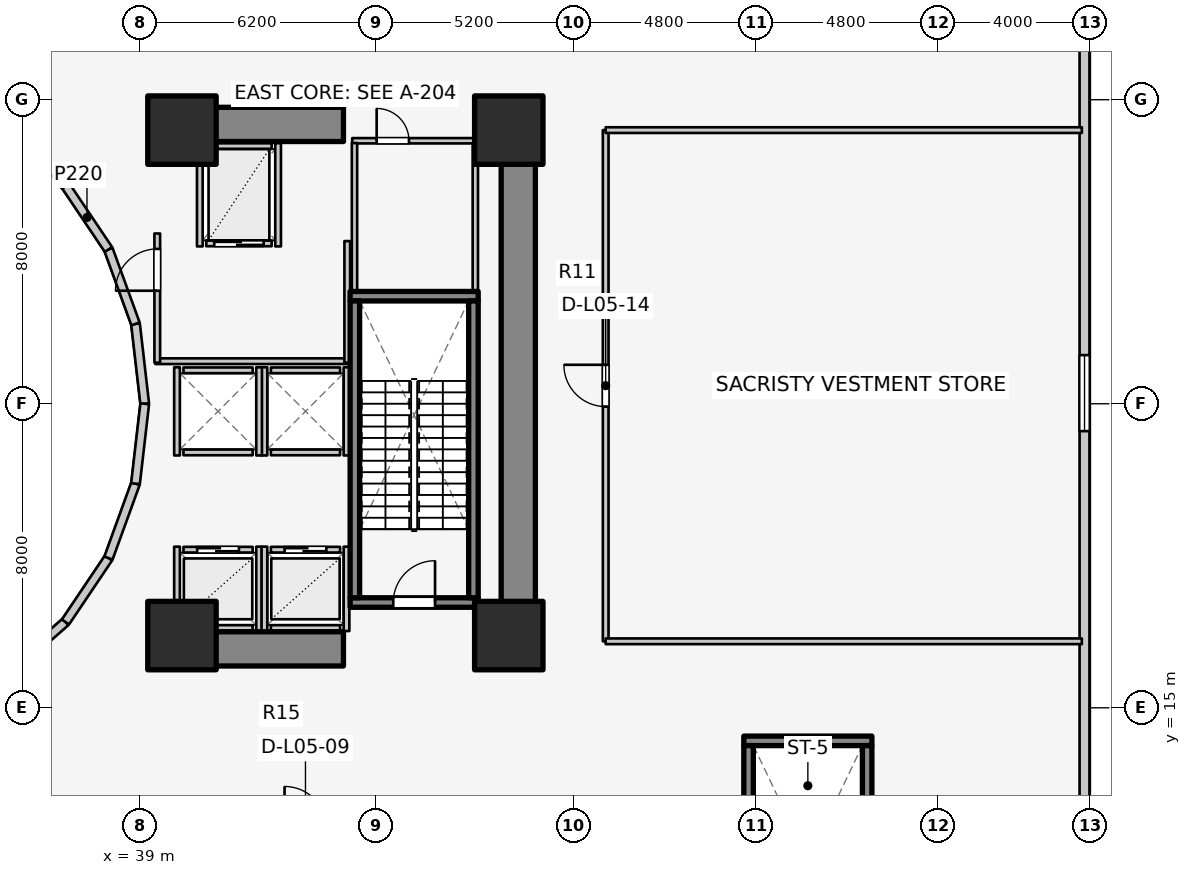
"""IFC4 building model, lengths in metres.
Left out: names, types, materials, properties, quantities, classifications, styles, units other than length and angle.
Written with IfcOpenShell. Run it as: python <this file> out.ifc"""

import sys

from ifc_helpers import new_model, si_unit, direction, frame, frame_2d, origin, origin_2d, place, context, subcontext, project, spatial, rectangle, extrude, element, fill, save


model = new_model("IFC4")
c1 = context("Model", 3, precision=1e-05, world=origin(), true_north=direction((0.0, 1.0)))
c2 = subcontext(c1, "Body", "Model", "MODEL_VIEW")
j1 = project(units=[si_unit("LENGTHUNIT", "METRE"), si_unit("PLANEANGLEUNIT", "RADIAN")], contexts=[c1])
p1 = place(None, origin())
s1 = spatial("IfcSite", under=j1, at=p1, CompositionType="ELEMENT")
p2 = place(p1, origin())
s2 = spatial("IfcBuilding", under=s1, at=p2, CompositionType="ELEMENT")
p3 = place(p2, frame((0.0, 0.0, 18.4)))
s3 = spatial("IfcBuildingStorey", under=s2, at=p3, CompositionType="ELEMENT", Elevation=18.4)
p4 = place(p3, frame((48.95, 17.05, 0.0), z_axis=(0.0, 0.0, 1.0), x_axis=(0.0, 1.0, 0.0)))
e1 = element("IfcWall", 1, at=p4, inside=s3, PredefinedType="SHEAR", context=c2, shape_type="SweptSolid", body=[
    extrude(rectangle(XDim=12.8, YDim=0.9, at=frame_2d((6.4, 0.0))), origin(), (0.0, 0.0, 1.0), 4.6),
])
for number, where, z_axis, x_axis in (
    (2, (39.85, 16.55, 0.0), (0.0, 0.0, 1.0), (1.0, 0.0, 0.0)),
    (3, (39.85, 30.35, 0.0), (0.0, 0.0, 1.0), (1.0, 0.0, 0.0)),
):
    element("IfcWall", number, at=place(p3, frame(where, z_axis=z_axis, x_axis=x_axis)), inside=s3, PredefinedType="SHEAR", context=c2, shape_type="SweptSolid", body=[
        extrude(rectangle(XDim=4.5, YDim=0.9, at=frame_2d((2.25, 0.0))), origin(), (0.0, 0.0, 1.0), 4.6),
    ])
p5 = place(p3, frame((44.525, 17.77, 0.0), z_axis=(0.0, 0.0, 1.0), x_axis=(1.0, 0.0, 0.0)))
e4 = element("IfcWall", 4, at=p5, inside=s3, PredefinedType="SOLIDWALL", context=c2, shape_type="SweptSolid", body=[
    extrude(rectangle(XDim=3.37, YDim=0.25, at=frame_2d((1.685, 0.0))), origin(), (0.0, 0.0, 1.0), 4.6),
])
p6 = place(p5, frame((1.135, 0.0, 0.0)))
e5 = element("IfcOpeningElement", 5, at=p6, cuts=e4, PredefinedType="OPENING", context=c2, shape_type="SweptSolid", body=[
    extrude(rectangle(XDim=1.1, YDim=2.1, at=frame_2d((0.55, 1.05))), frame((0.0, 0.135, 0.0), z_axis=(0.0, -1.0, 0.0), x_axis=(1.0, 0.0, 0.0)), (0.0, 0.0, 1.0), 0.27),
])
p7 = place(p3, frame((44.525, 25.83, 0.0), z_axis=(0.0, 0.0, 1.0), x_axis=(1.0, 0.0, 0.0)))
e6 = element("IfcWall", 6, at=p7, inside=s3, PredefinedType="SOLIDWALL", context=c2, shape_type="SweptSolid", body=[
    extrude(rectangle(XDim=3.37, YDim=0.25, at=frame_2d((1.685, 0.0))), origin(), (0.0, 0.0, 1.0), 4.6),
])
for number, where, z_axis, x_axis in (
    (7, (44.65, 17.895, 0.0), (0.0, 0.0, 1.0), (0.0, 1.0, 0.0)),
    (8, (47.77, 17.895, 0.0), (0.0, 0.0, 1.0), (0.0, 1.0, 0.0)),
):
    element("IfcWall", number, at=place(p3, frame(where, z_axis=z_axis, x_axis=x_axis)), inside=s3, PredefinedType="SOLIDWALL", context=c2, shape_type="SweptSolid", body=[
        extrude(rectangle(XDim=7.81, YDim=0.25, at=frame_2d((3.905, 0.0))), origin(), (0.0, 0.0, 1.0), 4.6),
    ])
p8 = place(p3, frame((54.885, 14.13, 0.0), z_axis=(0.0, 0.0, 1.0), x_axis=(1.0, 0.0, 0.0)))
e9 = element("IfcWall", 9, at=p8, inside=s3, PredefinedType="SOLIDWALL", context=c2, shape_type="SweptSolid", body=[
    extrude(rectangle(XDim=3.37, YDim=0.25, at=frame_2d((1.685, 0.0))), origin(), (0.0, 0.0, 1.0), 4.6),
])
for number, where, z_axis, x_axis in (
    (10, (55.01, 6.195, 0.0), (0.0, 0.0, 1.0), (0.0, 1.0, 0.0)),
    (11, (58.13, 6.195, 0.0), (0.0, 0.0, 1.0), (0.0, 1.0, 0.0)),
):
    element("IfcWall", number, at=place(p3, frame(where, z_axis=z_axis, x_axis=x_axis)), inside=s3, PredefinedType="SOLIDWALL", context=c2, shape_type="SweptSolid", body=[
        extrude(rectangle(XDim=7.81, YDim=0.25, at=frame_2d((3.905, 0.0))), origin(), (0.0, 0.0, 1.0), 4.6),
    ])
for number, where, z_axis, x_axis in (
    (12, (40.1, 16.9, 0.0), (0.0, 0.0, 1.0), (1.0, 0.0, 0.0)),
    (13, (48.7, 16.9, 0.0), (0.0, 0.0, 1.0), (1.0, 0.0, 0.0)),
    (14, (48.7, 30.2, 0.0), (0.0, 0.0, 1.0), (1.0, 0.0, 0.0)),
    (15, (40.1, 30.2, 0.0), (0.0, 0.0, 1.0), (1.0, 0.0, 0.0)),
):
    element("IfcColumn", number, at=place(p3, frame(where, z_axis=z_axis, x_axis=x_axis)), inside=s3, PredefinedType="COLUMN", context=c2, shape_type="SweptSolid", body=[
        extrude(rectangle(XDim=1.8, YDim=1.8, at=origin_2d()), origin(), (0.0, 0.0, 1.0), 4.6),
    ])
p9 = place(p3, frame((63.85, 0.28, 0.0), z_axis=(0.0, 0.0, 1.0), x_axis=(0.0, 1.0, 0.0)))
e16 = element("IfcWall", 16, at=p9, inside=s3, PredefinedType="STANDARD", context=c2, shape_type="SweptSolid", body=[
    extrude(rectangle(XDim=45.44, YDim=0.26, at=frame_2d((22.72, 0.0))), origin(), (0.0, 0.0, 1.0), 4.28),
])
p10 = place(p9, frame((6.0, 0.0, 2.2)))
e17 = element("IfcOpeningElement", 17, at=p10, cuts=e16, PredefinedType="OPENING", context=c2, shape_type="SweptSolid", body=[
    extrude(rectangle(XDim=2.0, YDim=1.1, at=frame_2d((1.0, 0.55))), frame((0.0, 0.14, 0.0), z_axis=(0.0, -1.0, 0.0), x_axis=(1.0, 0.0, 0.0)), (0.0, 0.0, 1.0), 0.28),
])
p11 = place(p9, frame((22.0, 0.0, 2.2)))
e18 = element("IfcOpeningElement", 18, at=p11, cuts=e16, PredefinedType="OPENING", context=c2, shape_type="SweptSolid", body=[
    extrude(rectangle(XDim=2.0, YDim=1.1, at=frame_2d((1.0, 0.55))), frame((0.0, 0.14, 0.0), z_axis=(0.0, -1.0, 0.0), x_axis=(1.0, 0.0, 0.0)), (0.0, 0.0, 1.0), 0.28),
])
p12 = place(p9, frame((38.0, 0.0, 2.2)))
e19 = element("IfcOpeningElement", 19, at=p12, cuts=e16, PredefinedType="OPENING", context=c2, shape_type="SweptSolid", body=[
    extrude(rectangle(XDim=2.0, YDim=1.1, at=frame_2d((1.0, 0.55))), frame((0.0, 0.14, 0.0), z_axis=(0.0, -1.0, 0.0), x_axis=(1.0, 0.0, 0.0)), (0.0, 0.0, 1.0), 0.28),
])
p13 = place(p3, frame((39.12, 23.0, 0.0), z_axis=(0.0, 0.0, 1.0), x_axis=(-0.114711713601, 0.993398823617, 0.0)))
e20 = element("IfcWall", 20, at=p13, inside=s3, PredefinedType="STANDARD", context=c2, shape_type="SweptSolid", body=[
    extrude(rectangle(XDim=2.115, YDim=0.23, at=frame_2d((1.058, 0.0))), origin(), (0.0, 0.0, 1.0), 3.28),
])
p14 = place(p3, frame((38.877, 25.102, 0.0), z_axis=(0.0, 0.0, 1.0), x_axis=(-0.341423187295, 0.93990968033, 0.0)))
e21 = element("IfcWall", 21, at=p14, inside=s3, PredefinedType="STANDARD", context=c2, shape_type="SweptSolid", body=[
    extrude(rectangle(XDim=2.084, YDim=0.23, at=frame_2d((1.042, 0.0))), origin(), (0.0, 0.0, 1.0), 3.28),
])
p15 = place(p3, frame((38.166, 27.06, 0.0), z_axis=(0.0, 0.0, 1.0), x_axis=(-0.558197800898, 0.829707909492, 0.0)))
e22 = element("IfcWall", 22, at=p15, inside=s3, PredefinedType="STANDARD", context=c2, shape_type="SweptSolid", body=[
    extrude(rectangle(XDim=2.027, YDim=0.23, at=frame_2d((1.013, 0.0))), origin(), (0.0, 0.0, 1.0), 3.28),
])
for number, where, z_axis, x_axis in (
    (23, (37.035, 28.742, 0.0), (0.0, 0.0, 1.0), (-0.753, 0.659, 0.0)),
    (24, (35.56, 15.968, 0.0), (0.0, 0.0, 1.0), (0.753, 0.659, 0.0)),
):
    element("IfcWall", number, at=place(p3, frame(where, z_axis=z_axis, x_axis=x_axis)), inside=s3, PredefinedType="STANDARD", context=c2, shape_type="SweptSolid", body=[
        extrude(rectangle(XDim=1.959, YDim=0.23, at=frame_2d((0.98, 0.0))), origin(), (0.0, 0.0, 1.0), 3.28),
    ])
p16 = place(p3, frame((37.035, 17.258, 0.0), z_axis=(0.0, 0.0, 1.0), x_axis=(0.558197800898, 0.829707909492, 0.0)))
e25 = element("IfcWall", 25, at=p16, inside=s3, PredefinedType="STANDARD", context=c2, shape_type="SweptSolid", body=[
    extrude(rectangle(XDim=2.027, YDim=0.23, at=frame_2d((1.013, 0.0))), origin(), (0.0, 0.0, 1.0), 3.28),
])
p17 = place(p3, frame((38.166, 18.94, 0.0), z_axis=(0.0, 0.0, 1.0), x_axis=(0.341423187295, 0.93990968033, 0.0)))
e26 = element("IfcWall", 26, at=p17, inside=s3, PredefinedType="STANDARD", context=c2, shape_type="SweptSolid", body=[
    extrude(rectangle(XDim=2.084, YDim=0.23, at=frame_2d((1.042, 0.0))), origin(), (0.0, 0.0, 1.0), 3.28),
])
p18 = place(p3, frame((38.877, 20.898, 0.0), z_axis=(0.0, 0.0, 1.0), x_axis=(0.114711713601, 0.993398823617, 0.0)))
e27 = element("IfcWall", 27, at=p18, inside=s3, PredefinedType="STANDARD", context=c2, shape_type="SweptSolid", body=[
    extrude(rectangle(XDim=2.115, YDim=0.23, at=frame_2d((1.058, 0.0))), origin(), (0.0, 0.0, 1.0), 3.28),
])
p19 = place(p3, frame((40.14, 19.16, 0.0), z_axis=(0.0, 0.0, 1.0), x_axis=(1.0, 0.0, 0.0)))
e28 = element("IfcWall", 28, at=p19, inside=s3, PredefinedType="SOLIDWALL", context=c2, shape_type="SweptSolid", body=[
    extrude(rectangle(XDim=1.82, YDim=0.15, at=frame_2d((0.91, 0.0))), origin(), (0.0, 0.0, 1.0), 3.62),
])
p20 = place(p19, frame((0.36, 0.0, 0.0)))
e29 = element("IfcOpeningElement", 29, at=p20, cuts=e28, PredefinedType="OPENING", context=c2, shape_type="SweptSolid", body=[
    extrude(rectangle(XDim=1.1, YDim=2.1, at=frame_2d((0.55, 1.05))), frame((0.0, 0.085, 0.0), z_axis=(0.0, -1.0, 0.0), x_axis=(1.0, 0.0, 0.0)), (0.0, 0.0, 1.0), 0.17),
])
p21 = place(p3, frame((40.14, 17.1, 0.0), z_axis=(0.0, 0.0, 1.0), x_axis=(1.0, 0.0, 0.0)))
e30 = element("IfcWall", 30, at=p21, inside=s3, PredefinedType="SOLIDWALL", context=c2, shape_type="SweptSolid", body=[
    extrude(rectangle(XDim=1.82, YDim=0.15, at=frame_2d((0.91, 0.0))), origin(), (0.0, 0.0, 1.0), 3.62),
])
p22 = place(p3, frame((39.97, 17.02, 0.0), z_axis=(0.0, 0.0, 1.0), x_axis=(0.0, 1.0, 0.0)))
e31 = element("IfcWall", 31, at=p22, inside=s3, PredefinedType="SOLIDWALL", context=c2, shape_type="SweptSolid", body=[
    extrude(rectangle(XDim=2.22, YDim=0.15, at=frame_2d((1.11, 0.0))), origin(), (0.0, 0.0, 1.0), 3.3),
])
p23 = place(p3, frame((42.13, 17.02, 0.0), z_axis=(0.0, 0.0, 1.0), x_axis=(0.0, 1.0, 0.0)))
e32 = element("IfcWall", 32, at=p23, inside=s3, PredefinedType="SOLIDWALL", context=c2, shape_type="SweptSolid", body=[
    extrude(rectangle(XDim=2.22, YDim=0.15, at=frame_2d((1.11, 0.0))), origin(), (0.0, 0.0, 1.0), 4.255),
])
p24 = place(p3, frame((42.44, 19.16, 0.0), z_axis=(0.0, 0.0, 1.0), x_axis=(1.0, 0.0, 0.0)))
e33 = element("IfcWall", 33, at=p24, inside=s3, PredefinedType="SOLIDWALL", context=c2, shape_type="SweptSolid", body=[
    extrude(rectangle(XDim=1.82, YDim=0.15, at=frame_2d((0.91, 0.0))), origin(), (0.0, 0.0, 1.0), 4.255),
])
p25 = place(p24, frame((0.36, 0.0, 0.0)))
e34 = element("IfcOpeningElement", 34, at=p25, cuts=e33, PredefinedType="OPENING", context=c2, shape_type="SweptSolid", body=[
    extrude(rectangle(XDim=1.1, YDim=2.1, at=frame_2d((0.55, 1.05))), frame((0.0, 0.085, 0.0), z_axis=(0.0, -1.0, 0.0), x_axis=(1.0, 0.0, 0.0)), (0.0, 0.0, 1.0), 0.17),
])
p26 = place(p3, frame((42.44, 17.1, 0.0), z_axis=(0.0, 0.0, 1.0), x_axis=(1.0, 0.0, 0.0)))
e35 = element("IfcWall", 35, at=p26, inside=s3, PredefinedType="SOLIDWALL", context=c2, shape_type="SweptSolid", body=[
    extrude(rectangle(XDim=1.82, YDim=0.15, at=frame_2d((0.91, 0.0))), origin(), (0.0, 0.0, 1.0), 4.255),
])
p27 = place(p3, frame((42.27, 17.02, 0.0), z_axis=(0.0, 0.0, 1.0), x_axis=(0.0, 1.0, 0.0)))
e36 = element("IfcWall", 36, at=p27, inside=s3, PredefinedType="SOLIDWALL", context=c2, shape_type="SweptSolid", body=[
    extrude(rectangle(XDim=2.22, YDim=0.15, at=frame_2d((1.11, 0.0))), origin(), (0.0, 0.0, 1.0), 4.255),
])
p28 = place(p3, frame((44.43, 17.02, 0.0), z_axis=(0.0, 0.0, 1.0), x_axis=(0.0, 1.0, 0.0)))
e37 = element("IfcWall", 37, at=p28, inside=s3, PredefinedType="SOLIDWALL", context=c2, shape_type="SweptSolid", body=[
    extrude(rectangle(XDim=2.22, YDim=0.15, at=frame_2d((1.11, 0.0))), origin(), (0.0, 0.0, 1.0), 3.62),
])
for number, where, z_axis, x_axis in (
    (38, (42.44, 21.72, 0.0), (0.0, 0.0, 1.0), (1.0, 0.0, 0.0)),
    (39, (42.44, 23.88, 0.0), (0.0, 0.0, 1.0), (1.0, 0.0, 0.0)),
):
    element("IfcWall", number, at=place(p3, frame(where, z_axis=z_axis, x_axis=x_axis)), inside=s3, PredefinedType="SOLIDWALL", context=c2, shape_type="SweptSolid", body=[
        extrude(rectangle(XDim=1.82, YDim=0.15, at=frame_2d((0.91, 0.0))), origin(), (0.0, 0.0, 1.0), 4.255),
    ])
for number, where, z_axis, x_axis in (
    (40, (42.27, 21.64, 0.0), (0.0, 0.0, 1.0), (0.0, 1.0, 0.0)),
    (41, (44.43, 21.64, 0.0), (0.0, 0.0, 1.0), (0.0, 1.0, 0.0)),
):
    element("IfcWall", number, at=place(p3, frame(where, z_axis=z_axis, x_axis=x_axis)), inside=s3, PredefinedType="SOLIDWALL", context=c2, shape_type="SweptSolid", body=[
        extrude(rectangle(XDim=2.32, YDim=0.15, at=frame_2d((1.16, 0.0))), origin(), (0.0, 0.0, 1.0), 4.255),
    ])
for number, where, z_axis, x_axis in (
    (42, (40.14, 21.72, 0.0), (0.0, 0.0, 1.0), (1.0, 0.0, 0.0)),
    (43, (40.14, 23.88, 0.0), (0.0, 0.0, 1.0), (1.0, 0.0, 0.0)),
):
    element("IfcWall", number, at=place(p3, frame(where, z_axis=z_axis, x_axis=x_axis)), inside=s3, PredefinedType="SOLIDWALL", context=c2, shape_type="SweptSolid", body=[
        extrude(rectangle(XDim=1.82, YDim=0.15, at=frame_2d((0.91, 0.0))), origin(), (0.0, 0.0, 1.0), 3.62),
    ])
p29 = place(p3, frame((39.97, 21.64, 0.0), z_axis=(0.0, 0.0, 1.0), x_axis=(0.0, 1.0, 0.0)))
e44 = element("IfcWall", 44, at=p29, inside=s3, PredefinedType="SOLIDWALL", context=c2, shape_type="SweptSolid", body=[
    extrude(rectangle(XDim=2.32, YDim=0.15, at=frame_2d((1.16, 0.0))), origin(), (0.0, 0.0, 1.0), 3.62),
])
p30 = place(p3, frame((42.13, 21.64, 0.0), z_axis=(0.0, 0.0, 1.0), x_axis=(0.0, 1.0, 0.0)))
e45 = element("IfcWall", 45, at=p30, inside=s3, PredefinedType="SOLIDWALL", context=c2, shape_type="SweptSolid", body=[
    extrude(rectangle(XDim=2.32, YDim=0.15, at=frame_2d((1.16, 0.0))), origin(), (0.0, 0.0, 1.0), 4.255),
])
p31 = place(p3, frame((40.74, 27.22, 0.0), z_axis=(0.0, 0.0, 1.0), x_axis=(1.0, 0.0, 0.0)))
e46 = element("IfcWall", 46, at=p31, inside=s3, PredefinedType="SOLIDWALL", context=c2, shape_type="SweptSolid", body=[
    extrude(rectangle(XDim=1.72, YDim=0.15, at=frame_2d((0.86, 0.0))), origin(), (0.0, 0.0, 1.0), 4.255),
])
p32 = place(p31, frame((0.21, 0.0, 0.0)))
e47 = element("IfcOpeningElement", 47, at=p32, cuts=e46, PredefinedType="OPENING", context=c2, shape_type="SweptSolid", body=[
    extrude(rectangle(XDim=1.3, YDim=2.1, at=frame_2d((0.65, 1.05))), frame((0.0, 0.085, 0.0), z_axis=(0.0, -1.0, 0.0), x_axis=(1.0, 0.0, 0.0)), (0.0, 0.0, 1.0), 0.17),
])
p33 = place(p3, frame((40.74, 29.78, 0.0), z_axis=(0.0, 0.0, 1.0), x_axis=(1.0, 0.0, 0.0)))
e48 = element("IfcWall", 48, at=p33, inside=s3, PredefinedType="SOLIDWALL", context=c2, shape_type="SweptSolid", body=[
    extrude(rectangle(XDim=1.72, YDim=0.15, at=frame_2d((0.86, 0.0))), origin(), (0.0, 0.0, 1.0), 4.255),
])
for number, where, z_axis, x_axis in (
    (49, (40.57, 27.14, 0.0), (0.0, 0.0, 1.0), (0.0, 1.0, 0.0)),
    (50, (42.63, 27.14, 0.0), (0.0, 0.0, 1.0), (0.0, 1.0, 0.0)),
):
    element("IfcWall", number, at=place(p3, frame(where, z_axis=z_axis, x_axis=x_axis)), inside=s3, PredefinedType="SOLIDWALL", context=c2, shape_type="SweptSolid", body=[
        extrude(rectangle(XDim=2.72, YDim=0.15, at=frame_2d((1.36, 0.0))), origin(), (0.0, 0.0, 1.0), 4.255),
    ])
p34 = place(p3, frame((39.4, 24.12, 0.0), z_axis=(0.0, 0.0, 1.0), x_axis=(1.0, 0.0, 0.0)))
e51 = element("IfcWall", 51, at=p34, inside=s3, PredefinedType="PARTITIONING", context=c2, shape_type="SweptSolid", body=[
    extrude(rectangle(XDim=5.08, YDim=0.15, at=frame_2d((2.54, 0.0))), origin(), (0.0, 0.0, 1.0), 3.62),
])
p35 = place(p3, frame((44.45, 24.08, 0.0), z_axis=(0.0, 0.0, 1.0), x_axis=(0.0, 1.0, 0.0)))
e52 = element("IfcWall", 52, at=p35, inside=s3, PredefinedType="PARTITIONING", context=c2, shape_type="SweptSolid", body=[
    extrude(rectangle(XDim=3.2, YDim=0.15, at=frame_2d((1.6, 0.0))), origin(), (0.0, 0.0, 1.0), 4.255),
])
p36 = place(p3, frame((39.45, 24.08, 0.0), z_axis=(0.0, 0.0, 1.0), x_axis=(0.0, 1.0, 0.0)))
e53 = element("IfcWall", 53, at=p36, inside=s3, PredefinedType="PARTITIONING", context=c2, shape_type="SweptSolid", body=[
    extrude(rectangle(XDim=3.4, YDim=0.15, at=frame_2d((1.7, 0.0))), origin(), (0.0, 0.0, 1.0), 4.255),
])
p37 = place(p36, frame((1.894, 0.0, 0.0)))
e54 = element("IfcOpeningElement", 54, at=p37, cuts=e53, PredefinedType="OPENING", context=c2, shape_type="SweptSolid", body=[
    extrude(rectangle(XDim=1.1, YDim=2.1, at=frame_2d((0.55, 1.05))), frame((0.0, 0.085, 0.0), z_axis=(0.0, -1.0, 0.0), x_axis=(1.0, 0.0, 0.0)), (0.0, 0.0, 1.0), 0.17),
])
p38 = place(p3, frame((51.25, 16.75, 0.0), z_axis=(0.0, 0.0, 1.0), x_axis=(0.0, 1.0, 0.0)))
e55 = element("IfcWall", 55, at=p38, inside=s3, PredefinedType="PARTITIONING", context=c2, shape_type="SweptSolid", body=[
    extrude(rectangle(XDim=13.45, YDim=0.15, at=frame_2d((6.725, 0.0))), origin(), (0.0, 0.0, 1.0), 4.255),
])
p39 = place(p38, frame((6.175, 0.0, 0.0)))
e56 = element("IfcOpeningElement", 56, at=p39, cuts=e55, PredefinedType="OPENING", context=c2, shape_type="SweptSolid", body=[
    extrude(rectangle(XDim=1.1, YDim=2.1, at=frame_2d((0.55, 1.05))), frame((0.0, 0.085, 0.0), z_axis=(0.0, -1.0, 0.0), x_axis=(1.0, 0.0, 0.0)), (0.0, 0.0, 1.0), 0.17),
])
for number, where, z_axis, x_axis in (
    (57, (51.25, 16.75, 0.0), (0.0, 0.0, 1.0), (1.0, 0.0, 0.0)),
    (58, (51.25, 30.2, 0.0), (0.0, 0.0, 1.0), (1.0, 0.0, 0.0)),
):
    element("IfcWall", number, at=place(p3, frame(where, z_axis=z_axis, x_axis=x_axis)), inside=s3, PredefinedType="PARTITIONING", context=c2, shape_type="SweptSolid", body=[
        extrude(rectangle(XDim=12.53, YDim=0.15, at=frame_2d((6.265, 0.0))), origin(), (0.0, 0.0, 1.0), 3.3),
    ])
p40 = place(p3, frame((44.58, 29.92, 0.0), z_axis=(0.0, 0.0, 1.0), x_axis=(1.0, 0.0, 0.0)))
e59 = element("IfcWall", 59, at=p40, inside=s3, PredefinedType="PLUMBINGWALL", context=c2, shape_type="SweptSolid", body=[
    extrude(rectangle(XDim=3.3, YDim=0.14, at=frame_2d((1.65, 0.0))), origin(), (0.0, 0.0, 1.0), 4.255),
])
p41 = place(p40, frame((0.643, 0.0, 0.0)))
e60 = element("IfcOpeningElement", 60, at=p41, cuts=e59, PredefinedType="OPENING", context=c2, shape_type="SweptSolid", body=[
    extrude(rectangle(XDim=0.85, YDim=2.05, at=frame_2d((0.425, 1.025))), frame((0.0, 0.08, 0.0), z_axis=(0.0, -1.0, 0.0), x_axis=(1.0, 0.0, 0.0)), (0.0, 0.0, 1.0), 0.16),
])
for number, where, z_axis, x_axis in (
    (61, (44.64, 25.98, 0.0), (0.0, 0.0, 1.0), (0.0, 1.0, 0.0)),
    (62, (47.82, 25.98, 0.0), (0.0, 0.0, 1.0), (0.0, 1.0, 0.0)),
):
    element("IfcWall", number, at=place(p3, frame(where, z_axis=z_axis, x_axis=x_axis)), inside=s3, PredefinedType="PLUMBINGWALL", context=c2, shape_type="SweptSolid", body=[
        extrude(rectangle(XDim=3.88, YDim=0.14, at=frame_2d((1.94, 0.0))), origin(), (0.0, 0.0, 1.0), 4.255),
    ])
p42 = place(p11, origin())
e63 = element("IfcWindow", 63, at=p42, inside=s3, PartitioningType="SINGLE_PANEL", PredefinedType="WINDOW", context=c2, shape_type="SweptSolid", body=[
    extrude(rectangle(XDim=2.0, YDim=1.1, at=frame_2d((1.0, 0.55))), frame((0.0, 0.03, 0.0), z_axis=(0.0, -1.0, 0.0), x_axis=(1.0, 0.0, 0.0)), (0.0, 0.0, 1.0), 0.06),
])
fill(e18, e63)
p43 = place(p6, origin())
e64 = element("IfcDoor", 64, at=p43, inside=s3, OperationType="SINGLE_SWING_RIGHT", PredefinedType="DOOR", context=c2, shape_type="SweptSolid", body=[
    extrude(rectangle(XDim=1.1, YDim=2.1, at=frame_2d((0.55, 1.05))), frame((0.0, 0.025, 0.0), z_axis=(0.0, -1.0, 0.0), x_axis=(1.0, 0.0, 0.0)), (0.0, 0.0, 1.0), 0.05),
])
fill(e5, e64)
p44 = place(p20, origin())
e65 = element("IfcDoor", 65, at=p44, inside=s3, OperationType="DOUBLE_DOOR_SLIDING", PredefinedType="DOOR", context=c2, shape_type="SweptSolid", body=[
    extrude(rectangle(XDim=1.1, YDim=2.1, at=frame_2d((0.55, 1.05))), frame((0.0, 0.025, 0.0), z_axis=(0.0, -1.0, 0.0), x_axis=(1.0, 0.0, 0.0)), (0.0, 0.0, 1.0), 0.05),
])
fill(e29, e65)
p45 = place(p25, origin())
e66 = element("IfcDoor", 66, at=p45, inside=s3, OperationType="DOUBLE_DOOR_SLIDING", PredefinedType="DOOR", context=c2, shape_type="SweptSolid", body=[
    extrude(rectangle(XDim=1.1, YDim=2.1, at=frame_2d((0.55, 1.05))), frame((0.0, 0.025, 0.0), z_axis=(0.0, -1.0, 0.0), x_axis=(1.0, 0.0, 0.0)), (0.0, 0.0, 1.0), 0.05),
])
fill(e34, e66)
p46 = place(p32, origin())
e67 = element("IfcDoor", 67, at=p46, inside=s3, OperationType="DOUBLE_DOOR_SLIDING", PredefinedType="DOOR", context=c2, shape_type="SweptSolid", body=[
    extrude(rectangle(XDim=1.3, YDim=2.1, at=frame_2d((0.65, 1.05))), frame((0.0, 0.025, 0.0), z_axis=(0.0, -1.0, 0.0), x_axis=(1.0, 0.0, 0.0)), (0.0, 0.0, 1.0), 0.05),
])
fill(e47, e67)
p47 = place(p37, origin())
e68 = element("IfcDoor", 68, at=p47, inside=s3, OperationType="SINGLE_SWING_LEFT", PredefinedType="DOOR", context=c2, shape_type="SweptSolid", body=[
    extrude(rectangle(XDim=1.1, YDim=2.1, at=frame_2d((0.55, 1.05))), frame((0.0, 0.025, 0.0), z_axis=(0.0, -1.0, 0.0), x_axis=(1.0, 0.0, 0.0)), (0.0, 0.0, 1.0), 0.05),
])
fill(e54, e68)
p48 = place(p39, origin())
e69 = element("IfcDoor", 69, at=p48, inside=s3, OperationType="SINGLE_SWING_RIGHT", PredefinedType="DOOR", context=c2, shape_type="SweptSolid", body=[
    extrude(rectangle(XDim=1.1, YDim=2.1, at=frame_2d((0.55, 1.05))), frame((0.0, 0.025, 0.0), z_axis=(0.0, -1.0, 0.0), x_axis=(1.0, 0.0, 0.0)), (0.0, 0.0, 1.0), 0.05),
])
fill(e56, e69)
p49 = place(p41, origin())
e70 = element("IfcDoor", 70, at=p49, inside=s3, OperationType="SINGLE_SWING_LEFT", PredefinedType="DOOR", context=c2, shape_type="SweptSolid", body=[
    extrude(rectangle(XDim=0.85, YDim=2.05, at=frame_2d((0.425, 1.025))), frame((0.0, 0.025, 0.0), z_axis=(0.0, -1.0, 0.0), x_axis=(1.0, 0.0, 0.0)), (0.0, 0.0, 1.0), 0.05),
])
fill(e60, e70)
save(model, sys.argv[1])
